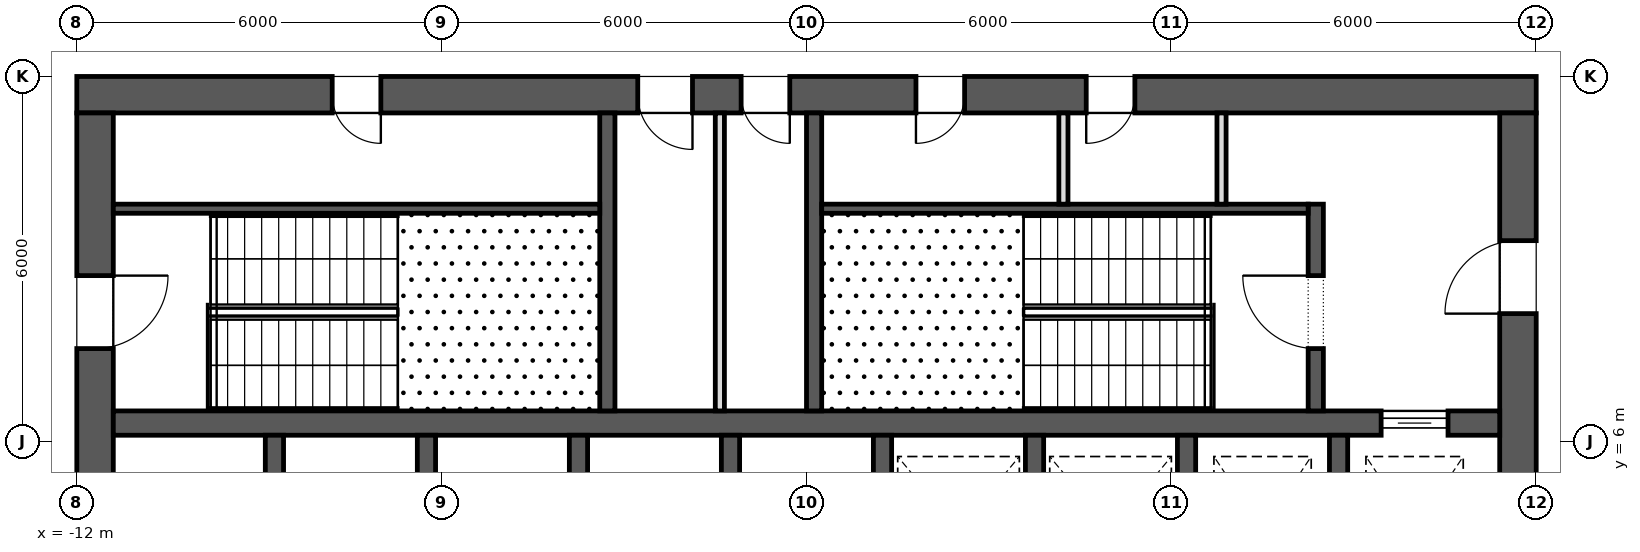
"""IFC4 building model, lengths in metres.
Left out: names, types, materials, properties, quantities, classifications, styles, units other than length and angle.
Written with IfcOpenShell. Run it as: python <this file> out.ifc"""

import sys

from ifc_helpers import new_model, si_unit, direction, frame, frame_2d, origin, place, context, subcontext, project, spatial, rectangle, extrude, element, fill, save


model = new_model("IFC4")
c1 = context("Model", 3, precision=1e-05, world=origin(), true_north=direction((0.0, 1.0)))
c2 = subcontext(c1, "Body", "Model", "MODEL_VIEW")
j1 = project(units=[si_unit("LENGTHUNIT", "METRE"), si_unit("PLANEANGLEUNIT", "RADIAN")], contexts=[c1])
p1 = place(None, origin())
s1 = spatial("IfcSite", under=j1, at=p1, CompositionType="ELEMENT")
p2 = place(p1, origin())
s2 = spatial("IfcBuilding", under=s1, at=p2, CompositionType="ELEMENT")
p3 = place(p2, frame((0.0, 0.0, 150.7)))
s3 = spatial("IfcBuildingStorey", under=s2, at=p3, CompositionType="ELEMENT", Elevation=150.7)
p4 = place(p3, frame((-12.0, 11.7, 0.0), z_axis=(0.0, 0.0, 1.0), x_axis=(1.0, 0.0, 0.0)))
e1 = element("IfcWall", 1, at=p4, inside=s3, PredefinedType="SHEAR", context=c2, shape_type="SweptSolid", body=[
    extrude(rectangle(XDim=24.0, YDim=0.6, at=frame_2d((12.0, 0.0))), origin(), (0.0, 0.0, 1.0), 4.2),
])
p5 = place(p4, frame((9.225, 0.0, 0.0)))
e2 = element("IfcOpeningElement", 2, at=p5, cuts=e1, PredefinedType="OPENING", context=c2, shape_type="SweptSolid", body=[
    extrude(rectangle(XDim=0.9, YDim=2.1, at=frame_2d((0.45, 1.05))), frame((0.0, 0.312, 0.0), z_axis=(0.0, -1.0, 0.0), x_axis=(1.0, 0.0, 0.0)), (0.0, 0.0, 1.0), 0.624),
])
p6 = place(p4, frame((10.925, 0.0, 0.0)))
e3 = element("IfcOpeningElement", 3, at=p6, cuts=e1, PredefinedType="OPENING", context=c2, shape_type="SweptSolid", body=[
    extrude(rectangle(XDim=0.8, YDim=2.1, at=frame_2d((0.4, 1.05))), frame((0.0, 0.312, 0.0), z_axis=(0.0, -1.0, 0.0), x_axis=(1.0, 0.0, 0.0)), (0.0, 0.0, 1.0), 0.624),
])
p7 = place(p4, frame((4.2, 0.0, 0.0)))
e4 = element("IfcOpeningElement", 4, at=p7, cuts=e1, PredefinedType="OPENING", context=c2, shape_type="SweptSolid", body=[
    extrude(rectangle(XDim=0.8, YDim=2.1, at=frame_2d((0.4, 1.05))), frame((0.0, 0.312, 0.0), z_axis=(0.0, -1.0, 0.0), x_axis=(1.0, 0.0, 0.0)), (0.0, 0.0, 1.0), 0.624),
])
p8 = place(p4, frame((13.8, 0.0, 0.0)))
e5 = element("IfcOpeningElement", 5, at=p8, cuts=e1, PredefinedType="OPENING", context=c2, shape_type="SweptSolid", body=[
    extrude(rectangle(XDim=0.8, YDim=2.1, at=frame_2d((0.4, 1.05))), frame((0.0, 0.312, 0.0), z_axis=(0.0, -1.0, 0.0), x_axis=(1.0, 0.0, 0.0)), (0.0, 0.0, 1.0), 0.624),
])
p9 = place(p4, frame((16.6, 0.0, 0.0)))
e6 = element("IfcOpeningElement", 6, at=p9, cuts=e1, PredefinedType="OPENING", context=c2, shape_type="SweptSolid", body=[
    extrude(rectangle(XDim=0.8, YDim=2.1, at=frame_2d((0.4, 1.05))), frame((0.0, 0.312, 0.0), z_axis=(0.0, -1.0, 0.0), x_axis=(1.0, 0.0, 0.0)), (0.0, 0.0, 1.0), 0.624),
])
p10 = place(p3, frame((11.7, -11.4, 0.0), z_axis=(0.0, 0.0, 1.0), x_axis=(0.0, 1.0, 0.0)))
e7 = element("IfcWall", 7, at=p10, inside=s3, PredefinedType="SHEAR", context=c2, shape_type="SweptSolid", body=[
    extrude(rectangle(XDim=22.8, YDim=0.6, at=frame_2d((11.4, 0.0))), origin(), (0.0, 0.0, 1.0), 4.2),
])
p11 = place(p10, frame((10.2, 0.0, 0.0)))
e8 = element("IfcOpeningElement", 8, at=p11, cuts=e7, PredefinedType="OPENING", context=c2, shape_type="SweptSolid", body=[
    extrude(rectangle(XDim=2.4, YDim=2.1, at=frame_2d((1.2, 1.05))), frame((0.0, 0.312, 0.0), z_axis=(0.0, -1.0, 0.0), x_axis=(1.0, 0.0, 0.0)), (0.0, 0.0, 1.0), 0.624),
])
p12 = place(p10, frame((19.5, 0.0, 0.0)))
e9 = element("IfcOpeningElement", 9, at=p12, cuts=e7, PredefinedType="OPENING", context=c2, shape_type="SweptSolid", body=[
    extrude(rectangle(XDim=1.2, YDim=2.1, at=frame_2d((0.6, 1.05))), frame((0.0, 0.312, 0.0), z_axis=(0.0, -1.0, 0.0), x_axis=(1.0, 0.0, 0.0)), (0.0, 0.0, 1.0), 0.624),
])
p13 = place(p10, frame((2.1, 0.0, 0.0)))
e10 = element("IfcOpeningElement", 10, at=p13, cuts=e7, PredefinedType="OPENING", context=c2, shape_type="SweptSolid", body=[
    extrude(rectangle(XDim=1.2, YDim=2.1, at=frame_2d((0.6, 1.05))), frame((0.0, 0.312, 0.0), z_axis=(0.0, -1.0, 0.0), x_axis=(1.0, 0.0, 0.0)), (0.0, 0.0, 1.0), 0.624),
])
p14 = place(p3, frame((-11.7, -11.4, 0.0), z_axis=(0.0, 0.0, 1.0), x_axis=(0.0, 1.0, 0.0)))
e11 = element("IfcWall", 11, at=p14, inside=s3, PredefinedType="SHEAR", context=c2, shape_type="SweptSolid", body=[
    extrude(rectangle(XDim=22.8, YDim=0.6, at=frame_2d((11.4, 0.0))), origin(), (0.0, 0.0, 1.0), 4.2),
])
p15 = place(p14, frame((10.2, 0.0, 0.0)))
e12 = element("IfcOpeningElement", 12, at=p15, cuts=e11, PredefinedType="OPENING", context=c2, shape_type="SweptSolid", body=[
    extrude(rectangle(XDim=2.4, YDim=2.1, at=frame_2d((1.2, 1.05))), frame((0.0, 0.312, 0.0), z_axis=(0.0, -1.0, 0.0), x_axis=(1.0, 0.0, 0.0)), (0.0, 0.0, 1.0), 0.624),
])
p16 = place(p14, frame((18.925, 0.0, 0.0)))
e13 = element("IfcOpeningElement", 13, at=p16, cuts=e11, PredefinedType="OPENING", context=c2, shape_type="SweptSolid", body=[
    extrude(rectangle(XDim=1.2, YDim=2.1, at=frame_2d((0.6, 1.05))), frame((0.0, 0.312, 0.0), z_axis=(0.0, -1.0, 0.0), x_axis=(1.0, 0.0, 0.0)), (0.0, 0.0, 1.0), 0.624),
])
p17 = place(p14, frame((2.675, 0.0, 0.0)))
e14 = element("IfcOpeningElement", 14, at=p17, cuts=e11, PredefinedType="OPENING", context=c2, shape_type="SweptSolid", body=[
    extrude(rectangle(XDim=1.2, YDim=2.1, at=frame_2d((0.6, 1.05))), frame((0.0, 0.312, 0.0), z_axis=(0.0, -1.0, 0.0), x_axis=(1.0, 0.0, 0.0)), (0.0, 0.0, 1.0), 0.624),
])
p18 = place(p3, frame((-11.4, 6.3, 0.0), z_axis=(0.0, 0.0, 1.0), x_axis=(1.0, 0.0, 0.0)))
e15 = element("IfcWall", 15, at=p18, inside=s3, PredefinedType="SHEAR", context=c2, shape_type="SweptSolid", body=[
    extrude(rectangle(XDim=22.8, YDim=0.4, at=frame_2d((11.4, 0.0))), origin(), (0.0, 0.0, 1.0), 4.2),
])
p19 = place(p18, frame((20.85, 0.0, 0.0)))
e16 = element("IfcOpeningElement", 16, at=p19, cuts=e15, PredefinedType="OPENING", context=c2, shape_type="SweptSolid", body=[
    extrude(rectangle(XDim=1.1, YDim=2.1, at=frame_2d((0.55, 1.05))), frame((0.0, 0.212, 0.0), z_axis=(0.0, -1.0, 0.0), x_axis=(1.0, 0.0, 0.0)), (0.0, 0.0, 1.0), 0.424),
])
for number, where, z_axis, x_axis in (
    (17, (-8.75, 3.2, 0.0), (0.0, 0.0, 1.0), (0.0, 1.0, 0.0)),
    (18, (-6.25, 3.2, 0.0), (0.0, 0.0, 1.0), (0.0, 1.0, 0.0)),
    (19, (-3.75, 3.2, 0.0), (0.0, 0.0, 1.0), (0.0, 1.0, 0.0)),
    (20, (-1.25, 3.2, 0.0), (0.0, 0.0, 1.0), (0.0, 1.0, 0.0)),
    (21, (1.25, 3.2, 0.0), (0.0, 0.0, 1.0), (0.0, 1.0, 0.0)),
    (22, (3.75, 3.2, 0.0), (0.0, 0.0, 1.0), (0.0, 1.0, 0.0)),
    (23, (6.25, 3.2, 0.0), (0.0, 0.0, 1.0), (0.0, 1.0, 0.0)),
    (24, (8.75, 3.2, 0.0), (0.0, 0.0, 1.0), (0.0, 1.0, 0.0)),
):
    element("IfcWall", number, at=place(p3, frame(where, z_axis=z_axis, x_axis=x_axis)), inside=s3, PredefinedType="SHEAR", context=c2, shape_type="SweptSolid", body=[
        extrude(rectangle(XDim=2.9, YDim=0.3, at=frame_2d((1.45, 0.0))), origin(), (0.0, 0.0, 1.0), 4.2),
    ])
for number, where, z_axis, x_axis in (
    (25, (-3.275, 6.5, 0.0), (0.0, 0.0, 1.0), (0.0, 1.0, 0.0)),
    (26, (0.125, 6.5, 0.0), (0.0, 0.0, 1.0), (0.0, 1.0, 0.0)),
):
    element("IfcWall", number, at=place(p3, frame(where, z_axis=z_axis, x_axis=x_axis)), inside=s3, PredefinedType="SHEAR", context=c2, shape_type="SweptSolid", body=[
        extrude(rectangle(XDim=4.9, YDim=0.25, at=frame_2d((2.45, 0.0))), origin(), (0.0, 0.0, 1.0), 3.9),
    ])
p20 = place(p3, frame((8.375, 6.5, 0.0), z_axis=(0.0, 0.0, 1.0), x_axis=(0.0, 1.0, 0.0)))
e27 = element("IfcWall", 27, at=p20, inside=s3, PredefinedType="SHEAR", context=c2, shape_type="SweptSolid", body=[
    extrude(rectangle(XDim=3.4, YDim=0.25, at=frame_2d((1.7, 0.0))), origin(), (0.0, 0.0, 1.0), 3.9),
])
p21 = place(p20, frame((1.025, 0.0, 0.0)))
e28 = element("IfcOpeningElement", 28, at=p21, cuts=e27, PredefinedType="OPENING", context=c2, shape_type="SweptSolid", body=[
    extrude(rectangle(XDim=1.2, YDim=2.1, at=frame_2d((0.6, 1.05))), frame((0.0, 0.137, 0.0), z_axis=(0.0, -1.0, 0.0), x_axis=(1.0, 0.0, 0.0)), (0.0, 0.0, 1.0), 0.274),
])
for number, where, z_axis, x_axis in (
    (29, (-11.4, 9.825, 0.0), (0.0, 0.0, 1.0), (1.0, 0.0, 0.0)),
    (30, (0.25, 9.825, 0.0), (0.0, 0.0, 1.0), (1.0, 0.0, 0.0)),
):
    element("IfcWall", number, at=place(p3, frame(where, z_axis=z_axis, x_axis=x_axis)), inside=s3, PredefinedType="SHEAR", context=c2, shape_type="SweptSolid", body=[
        extrude(rectangle(XDim=8.0, YDim=0.15, at=frame_2d((4.0, 0.0))), origin(), (0.0, 0.0, 1.0), 3.9),
    ])
p22 = place(p3, frame((-1.425, 6.5, 0.0), z_axis=(0.0, 0.0, 1.0), x_axis=(0.0, 1.0, 0.0)))
e31 = element("IfcWall", 31, at=p22, inside=s3, PredefinedType="PARTITIONING", context=c2, shape_type="SweptSolid", body=[
    extrude(rectangle(XDim=4.9, YDim=0.15, at=frame_2d((2.45, 0.0))), origin(), (0.0, 0.0, 1.0), 3.9),
])
for number, where, z_axis, x_axis in (
    (32, (4.225, 9.9, 0.0), (0.0, 0.0, 1.0), (0.0, 1.0, 0.0)),
    (33, (6.825, 9.9, 0.0), (0.0, 0.0, 1.0), (0.0, 1.0, 0.0)),
):
    element("IfcWall", number, at=place(p3, frame(where, z_axis=z_axis, x_axis=x_axis)), inside=s3, PredefinedType="PARTITIONING", context=c2, shape_type="SweptSolid", body=[
        extrude(rectangle(XDim=1.5, YDim=0.15, at=frame_2d((0.75, 0.0))), origin(), (0.0, 0.0, 1.0), 3.9),
    ])
p23 = place(p19, origin())
e34 = element("IfcDoor", 34, at=p23, inside=s3, OperationType="SLIDING_TO_LEFT", PredefinedType="DOOR", context=c2, shape_type="SweptSolid", body=[
    extrude(rectangle(XDim=1.1, YDim=2.1, at=frame_2d((0.55, 1.05))), frame((0.0, 0.025, 0.0), z_axis=(0.0, -1.0, 0.0), x_axis=(1.0, 0.0, 0.0)), (0.0, 0.0, 1.0), 0.05),
])
fill(e16, e34)
p24 = place(p16, frame((1.2, 0.0, 0.0), z_axis=(0.0, 0.0, 1.0), x_axis=(-1.0, 0.0, 0.0)))
e35 = element("IfcDoor", 35, at=p24, inside=s3, OperationType="SINGLE_SWING_RIGHT", PredefinedType="DOOR", context=c2, shape_type="SweptSolid", body=[
    extrude(rectangle(XDim=1.2, YDim=2.1, at=frame_2d((0.6, 1.05))), frame((0.0, 0.025, 0.0), z_axis=(0.0, -1.0, 0.0), x_axis=(1.0, 0.0, 0.0)), (0.0, 0.0, 1.0), 0.05),
])
fill(e13, e35)
p25 = place(p21, origin())
e36 = element("IfcDoor", 36, at=p25, inside=s3, OperationType="SINGLE_SWING_LEFT", PredefinedType="DOOR", context=c2, shape_type="SweptSolid", body=[
    extrude(rectangle(XDim=1.2, YDim=2.1, at=frame_2d((0.6, 1.05))), frame((0.0, 0.025, 0.0), z_axis=(0.0, -1.0, 0.0), x_axis=(1.0, 0.0, 0.0)), (0.0, 0.0, 1.0), 0.05),
])
fill(e28, e36)
p26 = place(p12, origin())
e37 = element("IfcDoor", 37, at=p26, inside=s3, OperationType="SINGLE_SWING_RIGHT", PredefinedType="DOOR", context=c2, shape_type="SweptSolid", body=[
    extrude(rectangle(XDim=1.2, YDim=2.1, at=frame_2d((0.6, 1.05))), frame((0.0, 0.025, 0.0), z_axis=(0.0, -1.0, 0.0), x_axis=(1.0, 0.0, 0.0)), (0.0, 0.0, 1.0), 0.05),
])
fill(e9, e37)
p27 = place(p5, frame((0.9, 0.0, 0.0), z_axis=(0.0, 0.0, 1.0), x_axis=(-1.0, 0.0, 0.0)))
e38 = element("IfcDoor", 38, at=p27, inside=s3, OperationType="SINGLE_SWING_RIGHT", PredefinedType="DOOR", context=c2, shape_type="SweptSolid", body=[
    extrude(rectangle(XDim=0.9, YDim=2.1, at=frame_2d((0.45, 1.05))), frame((0.0, 0.025, 0.0), z_axis=(0.0, -1.0, 0.0), x_axis=(1.0, 0.0, 0.0)), (0.0, 0.0, 1.0), 0.05),
])
fill(e2, e38)
p28 = place(p6, frame((0.8, 0.0, 0.0), z_axis=(0.0, 0.0, 1.0), x_axis=(-1.0, 0.0, 0.0)))
e39 = element("IfcDoor", 39, at=p28, inside=s3, OperationType="SINGLE_SWING_RIGHT", PredefinedType="DOOR", context=c2, shape_type="SweptSolid", body=[
    extrude(rectangle(XDim=0.8, YDim=2.1, at=frame_2d((0.4, 1.05))), frame((0.0, 0.025, 0.0), z_axis=(0.0, -1.0, 0.0), x_axis=(1.0, 0.0, 0.0)), (0.0, 0.0, 1.0), 0.05),
])
fill(e3, e39)
p29 = place(p7, frame((0.8, 0.0, 0.0), z_axis=(0.0, 0.0, 1.0), x_axis=(-1.0, 0.0, 0.0)))
e40 = element("IfcDoor", 40, at=p29, inside=s3, OperationType="SINGLE_SWING_RIGHT", PredefinedType="DOOR", context=c2, shape_type="SweptSolid", body=[
    extrude(rectangle(XDim=0.8, YDim=2.1, at=frame_2d((0.4, 1.05))), frame((0.0, 0.025, 0.0), z_axis=(0.0, -1.0, 0.0), x_axis=(1.0, 0.0, 0.0)), (0.0, 0.0, 1.0), 0.05),
])
fill(e4, e40)
p30 = place(p8, frame((0.8, 0.0, 0.0), z_axis=(0.0, 0.0, 1.0), x_axis=(-1.0, 0.0, 0.0)))
e41 = element("IfcDoor", 41, at=p30, inside=s3, OperationType="SINGLE_SWING_LEFT", PredefinedType="DOOR", context=c2, shape_type="SweptSolid", body=[
    extrude(rectangle(XDim=0.8, YDim=2.1, at=frame_2d((0.4, 1.05))), frame((0.0, 0.025, 0.0), z_axis=(0.0, -1.0, 0.0), x_axis=(1.0, 0.0, 0.0)), (0.0, 0.0, 1.0), 0.05),
])
fill(e5, e41)
p31 = place(p9, frame((0.8, 0.0, 0.0), z_axis=(0.0, 0.0, 1.0), x_axis=(-1.0, 0.0, 0.0)))
e42 = element("IfcDoor", 42, at=p31, inside=s3, OperationType="SINGLE_SWING_LEFT", PredefinedType="DOOR", context=c2, shape_type="SweptSolid", body=[
    extrude(rectangle(XDim=0.8, YDim=2.1, at=frame_2d((0.4, 1.05))), frame((0.0, 0.025, 0.0), z_axis=(0.0, -1.0, 0.0), x_axis=(1.0, 0.0, 0.0)), (0.0, 0.0, 1.0), 0.05),
])
fill(e6, e42)
save(model, sys.argv[1])
